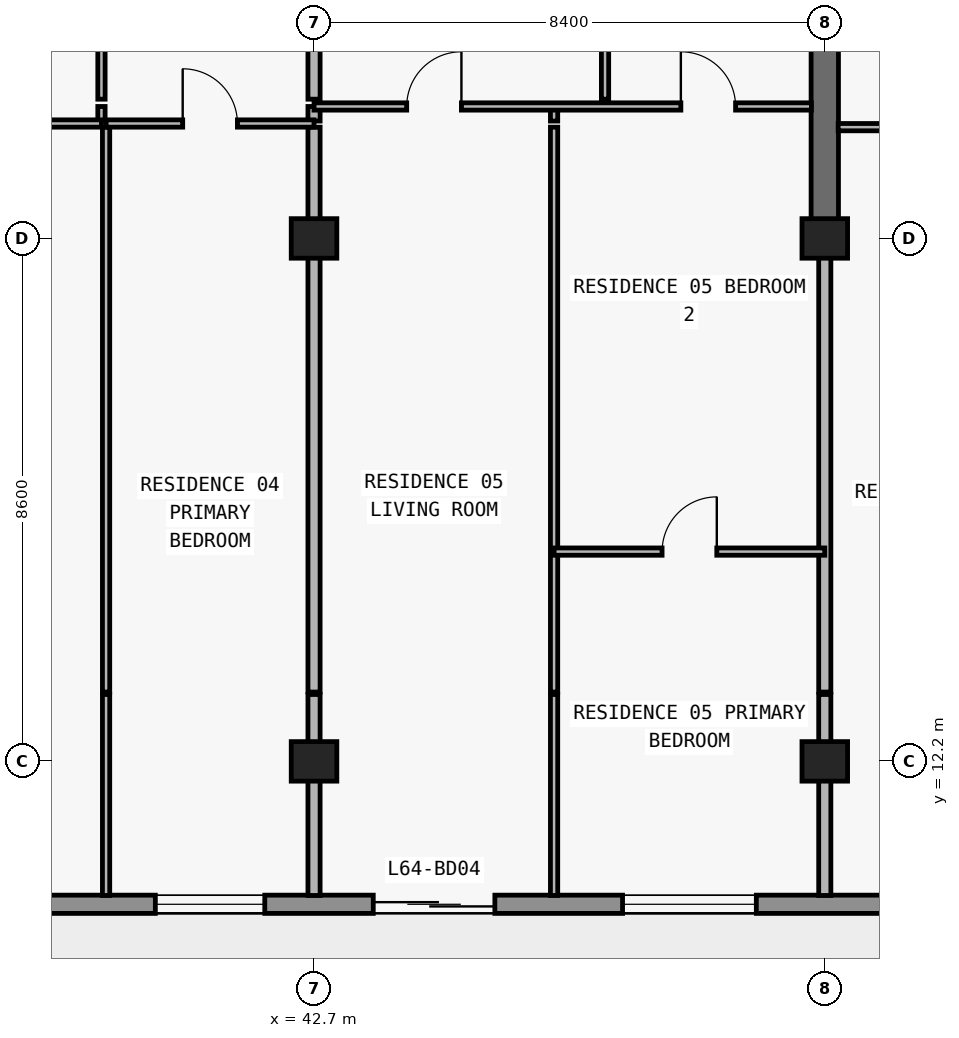
"""IFC4 building model, lengths in metres.
Left out: names, types, materials, properties, quantities, classifications, styles, units other than length and angle.
Written with IfcOpenShell. Run it as: python <this file> out.ifc"""

import sys

from ifc_helpers import new_model, si_unit, direction, frame, frame_2d, origin, origin_2d, place, context, subcontext, project, spatial, rectangle, extrude, element, fill, save


model = new_model("IFC4")
c1 = context("Model", 3, precision=1e-05, world=origin(), true_north=direction((0.0, 1.0)))
c2 = subcontext(c1, "Body", "Model", "MODEL_VIEW")
j1 = project(units=[si_unit("LENGTHUNIT", "METRE"), si_unit("PLANEANGLEUNIT", "RADIAN")], contexts=[c1])
p1 = place(None, origin())
s1 = spatial("IfcSite", under=j1, at=p1, CompositionType="ELEMENT")
p2 = place(p1, origin())
s2 = spatial("IfcBuilding", under=s1, at=p2, CompositionType="ELEMENT")
p3 = place(p2, frame((0.0, 0.0, 229.8)))
s3 = spatial("IfcBuildingStorey", under=s2, at=p3, CompositionType="ELEMENT", Elevation=229.8)
for number, where, z_axis, x_axis in (
    (1, (42.7, 12.2, 0.0), (0.0, 0.0, 1.0), (1.0, 0.0, 0.0)),
    (2, (51.1, 12.2, 0.0), (0.0, 0.0, 1.0), (1.0, 0.0, 0.0)),
    (3, (42.7, 20.8, 0.0), (0.0, 0.0, 1.0), (1.0, 0.0, 0.0)),
    (4, (51.1, 20.8, 0.0), (0.0, 0.0, 1.0), (1.0, 0.0, 0.0)),
):
    element("IfcColumn", number, at=place(p3, frame(where, z_axis=z_axis, x_axis=x_axis)), inside=s3, PredefinedType="COLUMN", context=c2, shape_type="SweptSolid", body=[
        extrude(rectangle(XDim=0.75, YDim=0.65, at=origin_2d()), origin(), (0.0, 0.0, 1.0), 3.05),
    ])
p4 = place(p3, frame((51.1, 20.8, 0.0), z_axis=(0.0, 0.0, 1.0), x_axis=(0.0, 1.0, 0.0)))
e5 = element("IfcWall", 5, at=p4, inside=s3, PredefinedType="SHEAR", context=c2, shape_type="SweptSolid", body=[
    extrude(rectangle(XDim=8.6, YDim=0.45, at=frame_2d((4.3, 0.0))), origin(), (0.0, 0.0, 1.0), 3.05),
])
p5 = place(p3, frame((65.7, 9.85, 0.0), z_axis=(0.0, 0.0, 1.0), x_axis=(-1.0, 0.0, 0.0)))
e6 = element("IfcWall", 6, at=p5, inside=s3, PredefinedType="STANDARD", context=c2, shape_type="SweptSolid", body=[
    extrude(rectangle(XDim=53.6, YDim=0.3, at=frame_2d((26.8, 0.0))), origin(), (0.0, 0.0, 1.0), 3.05),
])
p6 = place(p5, frame((48.05, 0.0, 0.85)))
e7 = element("IfcOpeningElement", 7, at=p6, cuts=e6, PredefinedType="OPENING", context=c2, shape_type="SweptSolid", body=[
    extrude(rectangle(XDim=1.8, YDim=1.55, at=frame_2d((0.9, 0.775))), frame((0.0, 0.16, 0.0), z_axis=(0.0, -1.0, 0.0), x_axis=(1.0, 0.0, 0.0)), (0.0, 0.0, 1.0), 0.32),
])
p7 = place(p5, frame((44.09, 0.0, 0.0)))
e8 = element("IfcOpeningElement", 8, at=p7, cuts=e6, PredefinedType="OPENING", context=c2, shape_type="SweptSolid", body=[
    extrude(rectangle(XDim=2.0, YDim=2.3, at=frame_2d((1.0, 1.15))), frame((0.0, 0.16, 0.0), z_axis=(0.0, -1.0, 0.0), x_axis=(1.0, 0.0, 0.0)), (0.0, 0.0, 1.0), 0.32),
])
p8 = place(p5, frame((39.99, 0.0, 0.85)))
e9 = element("IfcOpeningElement", 9, at=p8, cuts=e6, PredefinedType="OPENING", context=c2, shape_type="SweptSolid", body=[
    extrude(rectangle(XDim=1.8, YDim=1.55, at=frame_2d((0.9, 0.775))), frame((0.0, 0.16, 0.0), z_axis=(0.0, -1.0, 0.0), x_axis=(1.0, 0.0, 0.0)), (0.0, 0.0, 1.0), 0.32),
])
p9 = place(p5, frame((36.026, 0.0, 0.0)))
e10 = element("IfcOpeningElement", 10, at=p9, cuts=e6, PredefinedType="OPENING", context=c2, shape_type="SweptSolid", body=[
    extrude(rectangle(XDim=2.0, YDim=2.3, at=frame_2d((1.0, 1.15))), frame((0.0, 0.16, 0.0), z_axis=(0.0, -1.0, 0.0), x_axis=(1.0, 0.0, 0.0)), (0.0, 0.0, 1.0), 0.32),
])
p10 = place(p5, frame((31.726, 0.0, 0.85)))
e11 = element("IfcOpeningElement", 11, at=p10, cuts=e6, PredefinedType="OPENING", context=c2, shape_type="SweptSolid", body=[
    extrude(rectangle(XDim=2.2, YDim=1.55, at=frame_2d((1.1, 0.775))), frame((0.0, 0.16, 0.0), z_axis=(0.0, -1.0, 0.0), x_axis=(1.0, 0.0, 0.0)), (0.0, 0.0, 1.0), 0.32),
])
p11 = place(p5, frame((27.51, 0.0, 0.0)))
e12 = element("IfcOpeningElement", 12, at=p11, cuts=e6, PredefinedType="OPENING", context=c2, shape_type="SweptSolid", body=[
    extrude(rectangle(XDim=2.0, YDim=2.3, at=frame_2d((1.0, 1.15))), frame((0.0, 0.16, 0.0), z_axis=(0.0, -1.0, 0.0), x_axis=(1.0, 0.0, 0.0)), (0.0, 0.0, 1.0), 0.32),
])
p12 = place(p5, frame((23.81, 0.0, 0.85)))
e13 = element("IfcOpeningElement", 13, at=p12, cuts=e6, PredefinedType="OPENING", context=c2, shape_type="SweptSolid", body=[
    extrude(rectangle(XDim=1.8, YDim=1.55, at=frame_2d((0.9, 0.775))), frame((0.0, 0.16, 0.0), z_axis=(0.0, -1.0, 0.0), x_axis=(1.0, 0.0, 0.0)), (0.0, 0.0, 1.0), 0.32),
])
p13 = place(p5, frame((20.026, 0.0, 0.0)))
e14 = element("IfcOpeningElement", 14, at=p13, cuts=e6, PredefinedType="OPENING", context=c2, shape_type="SweptSolid", body=[
    extrude(rectangle(XDim=2.0, YDim=2.3, at=frame_2d((1.0, 1.15))), frame((0.0, 0.16, 0.0), z_axis=(0.0, -1.0, 0.0), x_axis=(1.0, 0.0, 0.0)), (0.0, 0.0, 1.0), 0.32),
])
p14 = place(p5, frame((15.726, 0.0, 0.85)))
e15 = element("IfcOpeningElement", 15, at=p14, cuts=e6, PredefinedType="OPENING", context=c2, shape_type="SweptSolid", body=[
    extrude(rectangle(XDim=2.2, YDim=1.55, at=frame_2d((1.1, 0.775))), frame((0.0, 0.16, 0.0), z_axis=(0.0, -1.0, 0.0), x_axis=(1.0, 0.0, 0.0)), (0.0, 0.0, 1.0), 0.32),
])
p15 = place(p5, frame((11.29, 0.0, 0.0)))
e16 = element("IfcOpeningElement", 16, at=p15, cuts=e6, PredefinedType="OPENING", context=c2, shape_type="SweptSolid", body=[
    extrude(rectangle(XDim=2.0, YDim=2.3, at=frame_2d((1.0, 1.15))), frame((0.0, 0.16, 0.0), z_axis=(0.0, -1.0, 0.0), x_axis=(1.0, 0.0, 0.0)), (0.0, 0.0, 1.0), 0.32),
])
p16 = place(p5, frame((7.19, 0.0, 0.85)))
e17 = element("IfcOpeningElement", 17, at=p16, cuts=e6, PredefinedType="OPENING", context=c2, shape_type="SweptSolid", body=[
    extrude(rectangle(XDim=1.8, YDim=1.55, at=frame_2d((0.9, 0.775))), frame((0.0, 0.16, 0.0), z_axis=(0.0, -1.0, 0.0), x_axis=(1.0, 0.0, 0.0)), (0.0, 0.0, 1.0), 0.32),
])
p17 = place(p5, frame((0.65, 0.0, 0.85)))
e18 = element("IfcOpeningElement", 18, at=p17, cuts=e6, PredefinedType="OPENING", context=c2, shape_type="SweptSolid", body=[
    extrude(rectangle(XDim=1.8, YDim=1.55, at=frame_2d((0.9, 0.775))), frame((0.0, 0.16, 0.0), z_axis=(0.0, -1.0, 0.0), x_axis=(1.0, 0.0, 0.0)), (0.0, 0.0, 1.0), 0.32),
])
p18 = place(p3, frame((39.204, 22.73, 0.0), z_axis=(0.0, 0.0, 1.0), x_axis=(0.0, 1.0, 0.0)))
e19 = element("IfcWall", 19, at=p18, inside=s3, PredefinedType="PARTITIONING", context=c2, shape_type="SweptSolid", body=[
    extrude(rectangle(XDim=0.24, YDim=0.12, at=frame_2d((0.12, 0.0))), origin(), (0.0, 0.0, 1.0), 3.05),
])
p19 = place(p3, frame((39.204, 23.09, 0.0), z_axis=(0.0, 0.0, 1.0), x_axis=(0.0, 1.0, 0.0)))
e20 = element("IfcWall", 20, at=p19, inside=s3, PredefinedType="PARTITIONING", context=c2, shape_type="SweptSolid", body=[
    extrude(rectangle(XDim=4.69, YDim=0.12, at=frame_2d((2.345, 0.0))), origin(), (0.0, 0.0, 1.0), 3.05),
])
p20 = place(p19, frame((1.895, 0.0, 0.0)))
e21 = element("IfcOpeningElement", 21, at=p20, cuts=e20, PredefinedType="OPENING", context=c2, shape_type="SweptSolid", body=[
    extrude(rectangle(XDim=0.9, YDim=2.15, at=frame_2d((0.45, 1.075))), frame((0.0, 0.07, 0.0), z_axis=(0.0, -1.0, 0.0), x_axis=(1.0, 0.0, 0.0)), (0.0, 0.0, 1.0), 0.14),
])
p21 = place(p3, frame((39.28, 9.995, 0.0), z_axis=(0.0, 0.0, 1.0), x_axis=(0.0, 1.0, 0.0)))
e22 = element("IfcWall", 22, at=p21, inside=s3, PredefinedType="PARTITIONING", context=c2, shape_type="SweptSolid", body=[
    extrude(rectangle(XDim=3.305, YDim=0.12, at=frame_2d((1.652, 0.0))), origin(), (0.0, 0.0, 1.0), 3.05),
])
p22 = place(p3, frame((39.28, 13.34, 0.0), z_axis=(0.0, 0.0, 1.0), x_axis=(0.0, 1.0, 0.0)))
e23 = element("IfcWall", 23, at=p22, inside=s3, PredefinedType="PARTITIONING", context=c2, shape_type="SweptSolid", body=[
    extrude(rectangle(XDim=9.29, YDim=0.12, at=frame_2d((4.645, 0.0))), origin(), (0.0, 0.0, 1.0), 3.05),
])
p23 = place(p3, frame((42.7, 9.995, 0.0), z_axis=(0.0, 0.0, 1.0), x_axis=(0.0, 1.0, 0.0)))
e24 = element("IfcWall", 24, at=p23, inside=s3, PredefinedType="PARTITIONING", context=c2, shape_type="SweptSolid", body=[
    extrude(rectangle(XDim=3.305, YDim=0.2, at=frame_2d((1.652, 0.0))), origin(), (0.0, 0.0, 1.0), 2.263),
])
p24 = place(p3, frame((42.7, 13.34, 0.0), z_axis=(0.0, 0.0, 1.0), x_axis=(0.0, 1.0, 0.0)))
e25 = element("IfcWall", 25, at=p24, inside=s3, PredefinedType="PARTITIONING", context=c2, shape_type="SweptSolid", body=[
    extrude(rectangle(XDim=9.29, YDim=0.2, at=frame_2d((4.645, 0.0))), origin(), (0.0, 0.0, 1.0), 2.263),
])
p25 = place(p3, frame((42.7, 22.73, 0.0), z_axis=(0.0, 0.0, 1.0), x_axis=(0.0, 1.0, 0.0)))
e26 = element("IfcWall", 26, at=p25, inside=s3, PredefinedType="PARTITIONING", context=c2, shape_type="SweptSolid", body=[
    extrude(rectangle(XDim=0.24, YDim=0.2, at=frame_2d((0.12, 0.0))), origin(), (0.0, 0.0, 1.0), 2.263),
])
p26 = place(p3, frame((42.7, 23.09, 0.0), z_axis=(0.0, 0.0, 1.0), x_axis=(0.0, 1.0, 0.0)))
e27 = element("IfcWall", 27, at=p26, inside=s3, PredefinedType="PARTITIONING", context=c2, shape_type="SweptSolid", body=[
    extrude(rectangle(XDim=4.69, YDim=0.2, at=frame_2d((2.345, 0.0))), origin(), (0.0, 0.0, 1.0), 2.263),
])
p27 = place(p3, frame((46.648, 9.995, 0.0), z_axis=(0.0, 0.0, 1.0), x_axis=(0.0, 1.0, 0.0)))
e28 = element("IfcWall", 28, at=p27, inside=s3, PredefinedType="PARTITIONING", context=c2, shape_type="SweptSolid", body=[
    extrude(rectangle(XDim=3.305, YDim=0.12, at=frame_2d((1.652, 0.0))), origin(), (0.0, 0.0, 1.0), 3.05),
])
p28 = place(p3, frame((46.648, 13.34, 0.0), z_axis=(0.0, 0.0, 1.0), x_axis=(0.0, 1.0, 0.0)))
e29 = element("IfcWall", 29, at=p28, inside=s3, PredefinedType="PARTITIONING", context=c2, shape_type="SweptSolid", body=[
    extrude(rectangle(XDim=9.29, YDim=0.12, at=frame_2d((4.645, 0.0))), origin(), (0.0, 0.0, 1.0), 3.05),
])
p29 = place(p3, frame((46.648, 22.73, 0.0), z_axis=(0.0, 0.0, 1.0), x_axis=(0.0, 1.0, 0.0)))
e30 = element("IfcWall", 30, at=p29, inside=s3, PredefinedType="PARTITIONING", context=c2, shape_type="SweptSolid", body=[
    extrude(rectangle(XDim=0.24, YDim=0.12, at=frame_2d((0.12, 0.0))), origin(), (0.0, 0.0, 1.0), 3.05),
])
p30 = place(p3, frame((47.486, 23.09, 0.0), z_axis=(0.0, 0.0, 1.0), x_axis=(0.0, 1.0, 0.0)))
e31 = element("IfcWall", 31, at=p30, inside=s3, PredefinedType="PARTITIONING", context=c2, shape_type="SweptSolid", body=[
    extrude(rectangle(XDim=4.69, YDim=0.12, at=frame_2d((2.345, 0.0))), origin(), (0.0, 0.0, 1.0), 3.05),
])
p31 = place(p30, frame((1.895, 0.0, 0.0)))
e32 = element("IfcOpeningElement", 32, at=p31, cuts=e31, PredefinedType="OPENING", context=c2, shape_type="SweptSolid", body=[
    extrude(rectangle(XDim=0.9, YDim=2.15, at=frame_2d((0.45, 1.075))), frame((0.0, 0.07, 0.0), z_axis=(0.0, -1.0, 0.0), x_axis=(1.0, 0.0, 0.0)), (0.0, 0.0, 1.0), 0.14),
])
p32 = place(p3, frame((51.1, 9.995, 0.0), z_axis=(0.0, 0.0, 1.0), x_axis=(0.0, 1.0, 0.0)))
e33 = element("IfcWall", 33, at=p32, inside=s3, PredefinedType="PARTITIONING", context=c2, shape_type="SweptSolid", body=[
    extrude(rectangle(XDim=3.305, YDim=0.2, at=frame_2d((1.652, 0.0))), origin(), (0.0, 0.0, 1.0), 2.263),
])
p33 = place(p3, frame((51.1, 13.34, 0.0), z_axis=(0.0, 0.0, 1.0), x_axis=(0.0, 1.0, 0.0)))
e34 = element("IfcWall", 34, at=p33, inside=s3, PredefinedType="PARTITIONING", context=c2, shape_type="SweptSolid", body=[
    extrude(rectangle(XDim=7.455, YDim=0.2, at=frame_2d((3.728, 0.0))), origin(), (0.0, 0.0, 1.0), 2.263),
])
p34 = place(p3, frame((46.648, 15.65, 0.0), z_axis=(0.0, 0.0, 1.0), x_axis=(1.0, 0.0, 0.0)))
e35 = element("IfcWall", 35, at=p34, inside=s3, PredefinedType="PARTITIONING", context=c2, shape_type="SweptSolid", body=[
    extrude(rectangle(XDim=4.452, YDim=0.12, at=frame_2d((2.226, 0.0))), origin(), (0.0, 0.0, 1.0), 3.05),
])
p35 = place(p34, frame((1.776, 0.0, 0.0)))
e36 = element("IfcOpeningElement", 36, at=p35, cuts=e35, PredefinedType="OPENING", context=c2, shape_type="SweptSolid", body=[
    extrude(rectangle(XDim=0.9, YDim=2.15, at=frame_2d((0.45, 1.075))), frame((0.0, 0.07, 0.0), z_axis=(0.0, -1.0, 0.0), x_axis=(1.0, 0.0, 0.0)), (0.0, 0.0, 1.0), 0.14),
])
p36 = place(p3, frame((51.32, 22.63, 0.0), z_axis=(0.0, 0.0, 1.0), x_axis=(1.0, 0.0, 0.0)))
e37 = element("IfcWall", 37, at=p36, inside=s3, PredefinedType="PARTITIONING", context=c2, shape_type="SweptSolid", body=[
    extrude(rectangle(XDim=8.18, YDim=0.12, at=frame_2d((4.09, 0.0))), origin(), (0.0, 0.0, 1.0), 3.05),
])
p37 = place(p36, frame((1.583, 0.0, 0.0)))
e38 = element("IfcOpeningElement", 38, at=p37, cuts=e37, PredefinedType="OPENING", context=c2, shape_type="SweptSolid", body=[
    extrude(rectangle(XDim=0.9, YDim=2.15, at=frame_2d((0.45, 1.075))), frame((0.0, 0.07, 0.0), z_axis=(0.0, -1.0, 0.0), x_axis=(1.0, 0.0, 0.0)), (0.0, 0.0, 1.0), 0.14),
])
p38 = place(p36, frame((5.84, 0.0, 0.0)))
e39 = element("IfcOpeningElement", 39, at=p38, cuts=e37, PredefinedType="OPENING", context=c2, shape_type="SweptSolid", body=[
    extrude(rectangle(XDim=0.9, YDim=2.15, at=frame_2d((0.45, 1.075))), frame((0.0, 0.07, 0.0), z_axis=(0.0, -1.0, 0.0), x_axis=(1.0, 0.0, 0.0)), (0.0, 0.0, 1.0), 0.14),
])
p39 = place(p3, frame((35.1, 22.69, 0.0), z_axis=(0.0, 0.0, 1.0), x_axis=(1.0, 0.0, 0.0)))
e40 = element("IfcWall", 40, at=p39, inside=s3, PredefinedType="PARTITIONING", context=c2, shape_type="SweptSolid", body=[
    extrude(rectangle(XDim=4.104, YDim=0.12, at=frame_2d((2.052, 0.0))), origin(), (0.0, 0.0, 1.0), 3.05),
])
p40 = place(p39, frame((1.602, 0.0, 0.0)))
e41 = element("IfcOpeningElement", 41, at=p40, cuts=e40, PredefinedType="OPENING", context=c2, shape_type="SweptSolid", body=[
    extrude(rectangle(XDim=0.9, YDim=2.15, at=frame_2d((0.45, 1.075))), frame((0.0, 0.07, 0.0), z_axis=(0.0, -1.0, 0.0), x_axis=(1.0, 0.0, 0.0)), (0.0, 0.0, 1.0), 0.14),
])
p41 = place(p3, frame((39.28, 22.69, 0.0), z_axis=(0.0, 0.0, 1.0), x_axis=(1.0, 0.0, 0.0)))
e42 = element("IfcWall", 42, at=p41, inside=s3, PredefinedType="PARTITIONING", context=c2, shape_type="SweptSolid", body=[
    extrude(rectangle(XDim=3.42, YDim=0.12, at=frame_2d((1.71, 0.0))), origin(), (0.0, 0.0, 1.0), 3.05),
])
p42 = place(p41, frame((1.26, 0.0, 0.0)))
e43 = element("IfcOpeningElement", 43, at=p42, cuts=e42, PredefinedType="OPENING", context=c2, shape_type="SweptSolid", body=[
    extrude(rectangle(XDim=0.9, YDim=2.15, at=frame_2d((0.45, 1.075))), frame((0.0, 0.07, 0.0), z_axis=(0.0, -1.0, 0.0), x_axis=(1.0, 0.0, 0.0)), (0.0, 0.0, 1.0), 0.14),
])
p43 = place(p3, frame((42.7, 22.97, 0.0), z_axis=(0.0, 0.0, 1.0), x_axis=(1.0, 0.0, 0.0)))
e44 = element("IfcWall", 44, at=p43, inside=s3, PredefinedType="PARTITIONING", context=c2, shape_type="SweptSolid", body=[
    extrude(rectangle(XDim=8.18, YDim=0.12, at=frame_2d((4.09, 0.0))), origin(), (0.0, 0.0, 1.0), 3.05),
])
p44 = place(p43, frame((1.524, 0.0, 0.0)))
e45 = element("IfcOpeningElement", 45, at=p44, cuts=e44, PredefinedType="OPENING", context=c2, shape_type="SweptSolid", body=[
    extrude(rectangle(XDim=0.9, YDim=2.15, at=frame_2d((0.45, 1.075))), frame((0.0, 0.07, 0.0), z_axis=(0.0, -1.0, 0.0), x_axis=(1.0, 0.0, 0.0)), (0.0, 0.0, 1.0), 0.14),
])
p45 = place(p43, frame((6.033, 0.0, 0.0)))
e46 = element("IfcOpeningElement", 46, at=p45, cuts=e44, PredefinedType="OPENING", context=c2, shape_type="SweptSolid", body=[
    extrude(rectangle(XDim=0.9, YDim=2.15, at=frame_2d((0.45, 1.075))), frame((0.0, 0.07, 0.0), z_axis=(0.0, -1.0, 0.0), x_axis=(1.0, 0.0, 0.0)), (0.0, 0.0, 1.0), 0.14),
])
p46 = place(p12, origin())
e47 = element("IfcWindow", 47, at=p46, inside=s3, PartitioningType="SINGLE_PANEL", PredefinedType="WINDOW", context=c2, shape_type="SweptSolid", body=[
    extrude(rectangle(XDim=1.8, YDim=1.55, at=frame_2d((0.9, 0.775))), frame((0.0, 0.03, 0.0), z_axis=(0.0, -1.0, 0.0), x_axis=(1.0, 0.0, 0.0)), (0.0, 0.0, 1.0), 0.06),
])
fill(e13, e47)
p47 = place(p13, origin())
e48 = element("IfcDoor", 48, at=p47, inside=s3, OperationType="DOUBLE_DOOR_SLIDING", PredefinedType="DOOR", context=c2, shape_type="SweptSolid", body=[
    extrude(rectangle(XDim=2.0, YDim=2.3, at=frame_2d((1.0, 1.15))), frame((0.0, 0.025, 0.0), z_axis=(0.0, -1.0, 0.0), x_axis=(1.0, 0.0, 0.0)), (0.0, 0.0, 1.0), 0.05),
])
fill(e14, e48)
p48 = place(p14, origin())
e49 = element("IfcWindow", 49, at=p48, inside=s3, PartitioningType="SINGLE_PANEL", PredefinedType="WINDOW", context=c2, shape_type="SweptSolid", body=[
    extrude(rectangle(XDim=2.2, YDim=1.55, at=frame_2d((1.1, 0.775))), frame((0.0, 0.03, 0.0), z_axis=(0.0, -1.0, 0.0), x_axis=(1.0, 0.0, 0.0)), (0.0, 0.0, 1.0), 0.06),
])
fill(e15, e49)
p49 = place(p42, origin())
e50 = element("IfcDoor", 50, at=p49, inside=s3, OperationType="SINGLE_SWING_LEFT", PredefinedType="DOOR", context=c2, shape_type="SweptSolid", body=[
    extrude(rectangle(XDim=0.9, YDim=2.15, at=frame_2d((0.45, 1.075))), frame((0.0, 0.025, 0.0), z_axis=(0.0, -1.0, 0.0), x_axis=(1.0, 0.0, 0.0)), (0.0, 0.0, 1.0), 0.05),
])
fill(e43, e50)
p50 = place(p44, origin())
e51 = element("IfcDoor", 51, at=p50, inside=s3, OperationType="SINGLE_SWING_RIGHT", PredefinedType="DOOR", context=c2, shape_type="SweptSolid", body=[
    extrude(rectangle(XDim=0.9, YDim=2.15, at=frame_2d((0.45, 1.075))), frame((0.0, 0.025, 0.0), z_axis=(0.0, -1.0, 0.0), x_axis=(1.0, 0.0, 0.0)), (0.0, 0.0, 1.0), 0.05),
])
fill(e45, e51)
p51 = place(p45, origin())
e52 = element("IfcDoor", 52, at=p51, inside=s3, OperationType="SINGLE_SWING_LEFT", PredefinedType="DOOR", context=c2, shape_type="SweptSolid", body=[
    extrude(rectangle(XDim=0.9, YDim=2.15, at=frame_2d((0.45, 1.075))), frame((0.0, 0.025, 0.0), z_axis=(0.0, -1.0, 0.0), x_axis=(1.0, 0.0, 0.0)), (0.0, 0.0, 1.0), 0.05),
])
fill(e46, e52)
p52 = place(p35, origin())
e53 = element("IfcDoor", 53, at=p52, inside=s3, OperationType="SINGLE_SWING_RIGHT", PredefinedType="DOOR", context=c2, shape_type="SweptSolid", body=[
    extrude(rectangle(XDim=0.9, YDim=2.15, at=frame_2d((0.45, 1.075))), frame((0.0, 0.025, 0.0), z_axis=(0.0, -1.0, 0.0), x_axis=(1.0, 0.0, 0.0)), (0.0, 0.0, 1.0), 0.05),
])
fill(e36, e53)
save(model, sys.argv[1])
